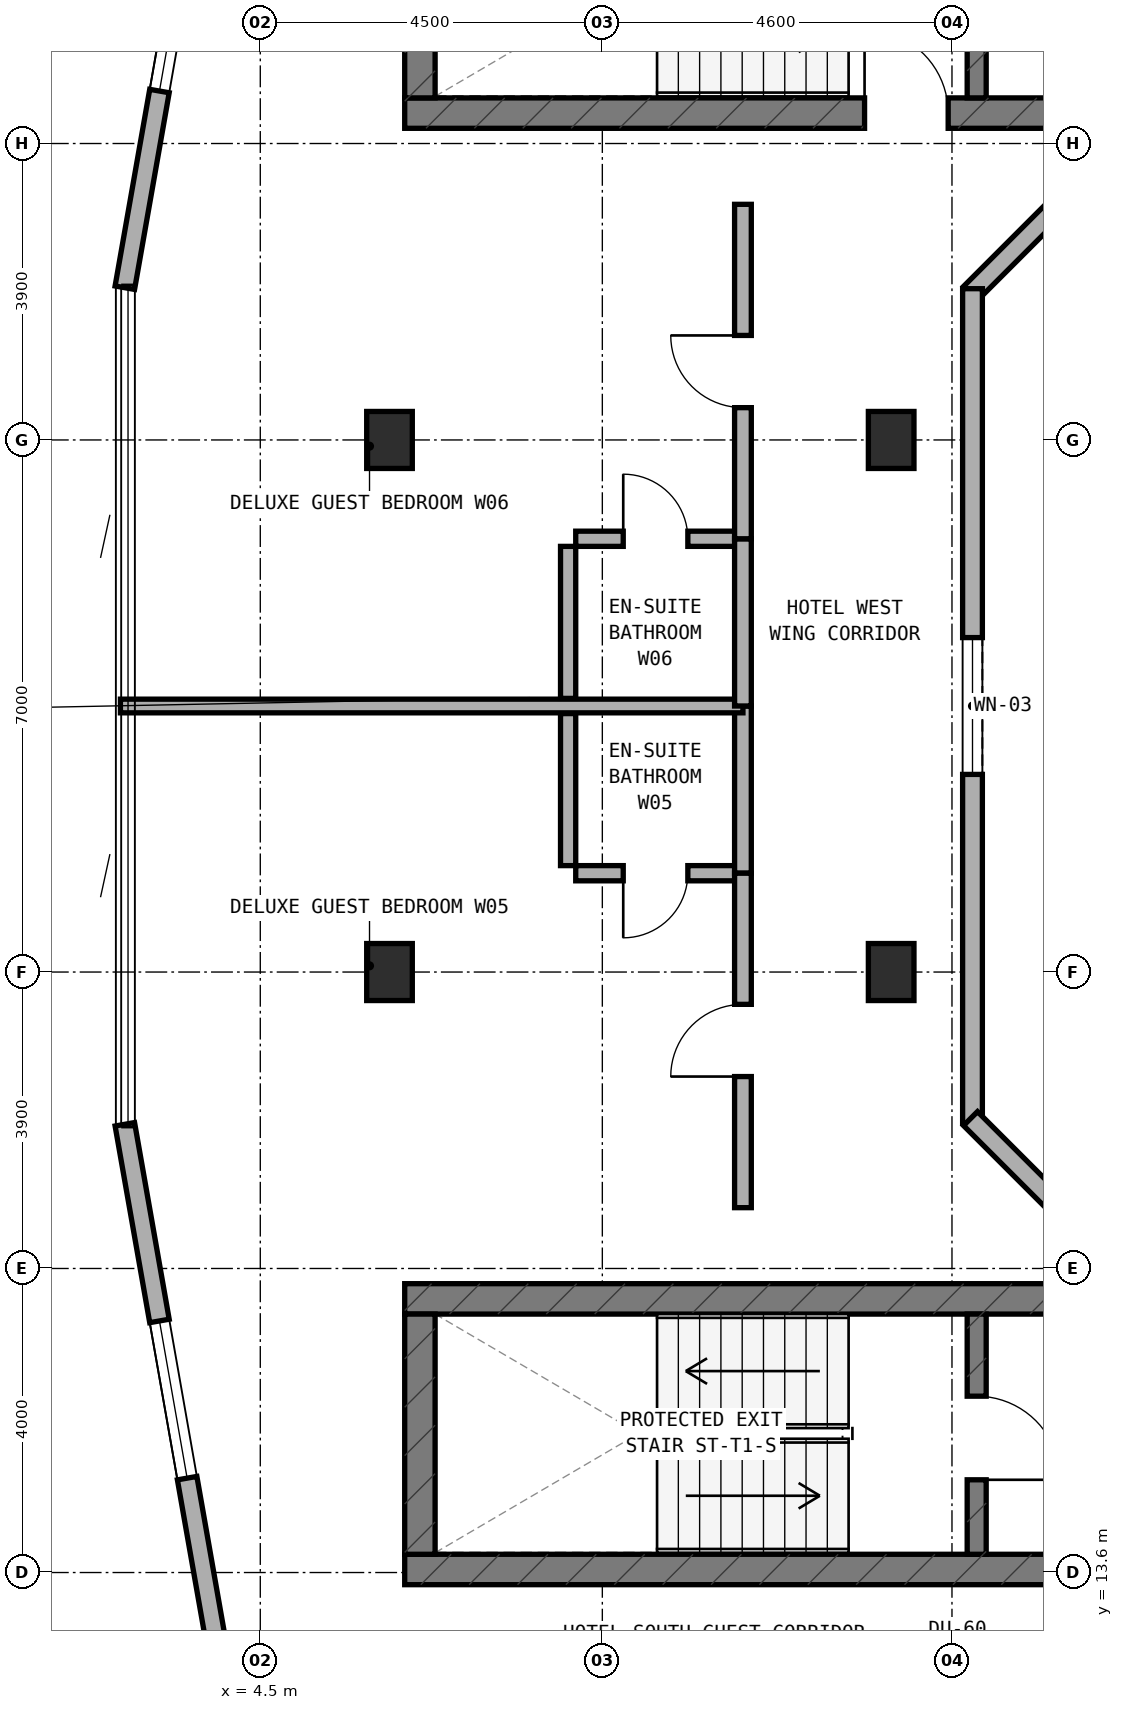
"""IFC4 building model, lengths in metres.
Left out: names, types, materials, properties, quantities, classifications, styles, units other than length and angle.
Written with IfcOpenShell. Run it as: python <this file> out.ifc"""

import sys

from ifc_helpers import new_model, si_unit, direction, frame, frame_2d, origin, origin_2d, place, context, subcontext, project, spatial, rectangle, extrude, element, fill, save


model = new_model("IFC4")
c1 = context("Model", 3, precision=1e-05, world=origin(), true_north=direction((0.0, 1.0)))
c2 = subcontext(c1, "Body", "Model", "MODEL_VIEW")
j1 = project(units=[si_unit("LENGTHUNIT", "METRE"), si_unit("PLANEANGLEUNIT", "RADIAN")], contexts=[c1])
p1 = place(None, origin())
s1 = spatial("IfcSite", under=j1, at=p1, CompositionType="ELEMENT")
p2 = place(p1, origin())
s2 = spatial("IfcBuilding", under=s1, at=p2, CompositionType="ELEMENT")
p3 = place(p2, frame((0.0, 0.0, 246.8)))
s3 = spatial("IfcBuildingStorey", under=s2, at=p3, CompositionType="ELEMENT", Elevation=246.8)
p4 = place(p3, frame((6.4, 32.8, 0.0), z_axis=(0.0, 0.0, 1.0), x_axis=(1.0, 0.0, 0.0)))
e1 = element("IfcWall", 1, at=p4, inside=s3, PredefinedType="SHEAR", context=c2, shape_type="SweptSolid", body=[
    extrude(rectangle(XDim=24.4, YDim=0.4, at=frame_2d((12.2, 0.0))), origin(), (0.0, 0.0, 1.0), 3.6),
])
p5 = place(p4, frame((6.05, 0.0, 0.0)))
e2 = element("IfcOpeningElement", 2, at=p5, cuts=e1, PredefinedType="OPENING", context=c2, shape_type="SweptSolid", body=[
    extrude(rectangle(XDim=1.1, YDim=2.15, at=frame_2d((0.55, 1.075))), frame((0.0, 0.21, 0.0), z_axis=(0.0, -1.0, 0.0), x_axis=(1.0, 0.0, 0.0)), (0.0, 0.0, 1.0), 0.42),
])
p6 = place(p3, frame((6.6, 33.0, 0.0), z_axis=(0.0, 0.0, 1.0), x_axis=(0.0, 1.0, 0.0)))
e3 = element("IfcWall", 3, at=p6, inside=s3, PredefinedType="SHEAR", context=c2, shape_type="SweptSolid", body=[
    extrude(rectangle(XDim=3.16, YDim=0.4, at=frame_2d((1.58, 0.0))), origin(), (0.0, 0.0, 1.0), 3.6),
])
p7 = place(p3, frame((13.925, 33.0, 0.0), z_axis=(0.0, 0.0, 1.0), x_axis=(0.0, 1.0, 0.0)))
e4 = element("IfcWall", 4, at=p7, inside=s3, PredefinedType="STANDARD", context=c2, shape_type="SweptSolid", body=[
    extrude(rectangle(XDim=3.16, YDim=0.25, at=frame_2d((1.58, 0.0))), origin(), (0.0, 0.0, 1.0), 3.32),
])
p8 = place(p7, frame((0.98, 0.0, 0.0)))
e5 = element("IfcOpeningElement", 5, at=p8, cuts=e4, PredefinedType="OPENING", context=c2, shape_type="SweptSolid", body=[
    extrude(rectangle(XDim=1.1, YDim=2.15, at=frame_2d((0.55, 1.075))), frame((0.0, 0.135, 0.0), z_axis=(0.0, -1.0, 0.0), x_axis=(1.0, 0.0, 0.0)), (0.0, 0.0, 1.0), 0.27),
])
p9 = place(p3, frame((6.4, 13.64, 0.0), z_axis=(0.0, 0.0, 1.0), x_axis=(1.0, 0.0, 0.0)))
e6 = element("IfcWall", 6, at=p9, inside=s3, PredefinedType="SHEAR", context=c2, shape_type="SweptSolid", body=[
    extrude(rectangle(XDim=24.4, YDim=0.4, at=frame_2d((12.2, 0.0))), origin(), (0.0, 0.0, 1.0), 3.6),
])
p10 = place(p9, frame((9.15, 0.0, 0.0)))
e7 = element("IfcOpeningElement", 7, at=p10, cuts=e6, PredefinedType="OPENING", context=c2, shape_type="SweptSolid", body=[
    extrude(rectangle(XDim=1.2, YDim=2.15, at=frame_2d((0.6, 1.075))), frame((0.0, 0.21, 0.0), z_axis=(0.0, -1.0, 0.0), x_axis=(1.0, 0.0, 0.0)), (0.0, 0.0, 1.0), 0.42),
])
p11 = place(p9, frame((17.22, 0.0, 0.0)))
e8 = element("IfcOpeningElement", 8, at=p11, cuts=e6, PredefinedType="OPENING", context=c2, shape_type="SweptSolid", body=[
    extrude(rectangle(XDim=0.85, YDim=2.1, at=frame_2d((0.425, 1.05))), frame((0.0, 0.21, 0.0), z_axis=(0.0, -1.0, 0.0), x_axis=(1.0, 0.0, 0.0)), (0.0, 0.0, 1.0), 0.42),
])
p12 = place(p9, frame((18.783, 0.0, 0.0)))
e9 = element("IfcOpeningElement", 9, at=p12, cuts=e6, PredefinedType="OPENING", context=c2, shape_type="SweptSolid", body=[
    extrude(rectangle(XDim=1.1, YDim=2.15, at=frame_2d((0.55, 1.075))), frame((0.0, 0.21, 0.0), z_axis=(0.0, -1.0, 0.0), x_axis=(1.0, 0.0, 0.0)), (0.0, 0.0, 1.0), 0.42),
])
p13 = place(p9, frame((20.65, 0.0, 0.0)))
e10 = element("IfcOpeningElement", 10, at=p13, cuts=e6, PredefinedType="OPENING", context=c2, shape_type="SweptSolid", body=[
    extrude(rectangle(XDim=1.1, YDim=2.15, at=frame_2d((0.55, 1.075))), frame((0.0, 0.21, 0.0), z_axis=(0.0, -1.0, 0.0), x_axis=(1.0, 0.0, 0.0)), (0.0, 0.0, 1.0), 0.42),
])
p14 = place(p9, frame((22.517, 0.0, 0.0)))
e11 = element("IfcOpeningElement", 11, at=p14, cuts=e6, PredefinedType="OPENING", context=c2, shape_type="SweptSolid", body=[
    extrude(rectangle(XDim=1.1, YDim=2.15, at=frame_2d((0.55, 1.075))), frame((0.0, 0.21, 0.0), z_axis=(0.0, -1.0, 0.0), x_axis=(1.0, 0.0, 0.0)), (0.0, 0.0, 1.0), 0.42),
])
p15 = place(p3, frame((6.4, 17.2, 0.0), z_axis=(0.0, 0.0, 1.0), x_axis=(1.0, 0.0, 0.0)))
e12 = element("IfcWall", 12, at=p15, inside=s3, PredefinedType="SHEAR", context=c2, shape_type="SweptSolid", body=[
    extrude(rectangle(XDim=24.4, YDim=0.4, at=frame_2d((12.2, 0.0))), origin(), (0.0, 0.0, 1.0), 3.6),
])
p16 = place(p3, frame((6.6, 13.84, 0.0), z_axis=(0.0, 0.0, 1.0), x_axis=(0.0, 1.0, 0.0)))
e13 = element("IfcWall", 13, at=p16, inside=s3, PredefinedType="SHEAR", context=c2, shape_type="SweptSolid", body=[
    extrude(rectangle(XDim=3.16, YDim=0.4, at=frame_2d((1.58, 0.0))), origin(), (0.0, 0.0, 1.0), 3.6),
])
p17 = place(p3, frame((13.925, 13.84, 0.0), z_axis=(0.0, 0.0, 1.0), x_axis=(0.0, 1.0, 0.0)))
e14 = element("IfcWall", 14, at=p17, inside=s3, PredefinedType="STANDARD", context=c2, shape_type="SweptSolid", body=[
    extrude(rectangle(XDim=3.16, YDim=0.25, at=frame_2d((1.58, 0.0))), origin(), (0.0, 0.0, 1.0), 3.32),
])
p18 = place(p17, frame((0.98, 0.0, 0.0)))
e15 = element("IfcOpeningElement", 15, at=p18, cuts=e14, PredefinedType="OPENING", context=c2, shape_type="SweptSolid", body=[
    extrude(rectangle(XDim=1.1, YDim=2.15, at=frame_2d((0.55, 1.075))), frame((0.0, 0.135, 0.0), z_axis=(0.0, -1.0, 0.0), x_axis=(1.0, 0.0, 0.0)), (0.0, 0.0, 1.0), 0.27),
])
for number, where, z_axis, x_axis in (
    (16, (6.2, 21.5, 0.0), (0.0, 0.0, 1.0), (1.0, 0.0, 0.0)),
    (17, (6.2, 28.5, 0.0), (0.0, 0.0, 1.0), (1.0, 0.0, 0.0)),
    (18, (12.8, 21.5, 0.0), (0.0, 0.0, 1.0), (1.0, 0.0, 0.0)),
    (19, (12.8, 28.5, 0.0), (0.0, 0.0, 1.0), (1.0, 0.0, 0.0)),
):
    element("IfcColumn", number, at=place(p3, frame(where, z_axis=z_axis, x_axis=x_axis)), inside=s3, PredefinedType="COLUMN", context=c2, shape_type="SweptSolid", body=[
        extrude(rectangle(XDim=0.6, YDim=0.75, at=origin_2d()), origin(), (0.0, 0.0, 1.0), 3.6),
    ])
p19 = place(p3, frame((4.229, 39.085, 0.0), z_axis=(0.0, 0.0, 1.0), x_axis=(-0.173396937698, -0.984852020355, 0.0)))
e20 = element("IfcWall", 20, at=p19, inside=s3, PredefinedType="STANDARD", context=c2, shape_type="SweptSolid", body=[
    extrude(rectangle(XDim=8.714, YDim=0.26, at=frame_2d((4.357, 0.0))), origin(), (0.0, 0.0, 1.0), 3.32),
])
p20 = place(p19, frame((3.987, 0.0, 0.85)))
e21 = element("IfcOpeningElement", 21, at=p20, cuts=e20, PredefinedType="OPENING", context=c2, shape_type="SweptSolid", body=[
    extrude(rectangle(XDim=2.1, YDim=1.5, at=frame_2d((1.05, 0.75))), frame((0.0, 0.14, 0.0), z_axis=(0.0, -1.0, 0.0), x_axis=(1.0, 0.0, 0.0)), (0.0, 0.0, 1.0), 0.28),
])
p21 = place(p3, frame((2.718, 19.497, 0.0), z_axis=(0.0, 0.0, 1.0), x_axis=(0.173396937698, -0.984852020355, 0.0)))
e22 = element("IfcWall", 22, at=p21, inside=s3, PredefinedType="STANDARD", context=c2, shape_type="SweptSolid", body=[
    extrude(rectangle(XDim=8.714, YDim=0.26, at=frame_2d((4.357, 0.0))), origin(), (0.0, 0.0, 1.0), 3.32),
])
p22 = place(p21, frame((2.627, 0.0, 0.85)))
e23 = element("IfcOpeningElement", 23, at=p22, cuts=e22, PredefinedType="OPENING", context=c2, shape_type="SweptSolid", body=[
    extrude(rectangle(XDim=2.1, YDim=1.5, at=frame_2d((1.05, 0.75))), frame((0.0, 0.14, 0.0), z_axis=(0.0, -1.0, 0.0), x_axis=(1.0, 0.0, 0.0)), (0.0, 0.0, 1.0), 0.28),
])
p23 = place(p3, frame((15.678, 32.262, 0.0), z_axis=(0.0, 0.0, 1.0), x_axis=(-0.707106781187, -0.707106781187, 0.0)))
e24 = element("IfcWall", 24, at=p23, inside=s3, PredefinedType="STANDARD", context=c2, shape_type="SweptSolid", body=[
    extrude(rectangle(XDim=2.594, YDim=0.26, at=frame_2d((1.297, 0.0))), origin(), (0.0, 0.0, 1.0), 3.32),
])
p24 = place(p3, frame((13.87, 30.49, 0.0), z_axis=(0.0, 0.0, 1.0), x_axis=(0.0, -1.0, 0.0)))
e25 = element("IfcWall", 25, at=p24, inside=s3, PredefinedType="STANDARD", context=c2, shape_type="SweptSolid", body=[
    extrude(rectangle(XDim=10.98, YDim=0.26, at=frame_2d((5.49, 0.0))), origin(), (0.0, 0.0, 1.0), 3.32),
])
p25 = place(p24, frame((4.59, 0.0, 0.85)))
e26 = element("IfcOpeningElement", 26, at=p25, cuts=e25, PredefinedType="OPENING", context=c2, shape_type="SweptSolid", body=[
    extrude(rectangle(XDim=1.8, YDim=1.5, at=frame_2d((0.9, 0.75))), frame((0.0, 0.14, 0.0), z_axis=(0.0, -1.0, 0.0), x_axis=(1.0, 0.0, 0.0)), (0.0, 0.0, 1.0), 0.28),
])
p26 = place(p3, frame((13.844, 19.572, 0.0), z_axis=(0.0, 0.0, 1.0), x_axis=(0.707106781187, -0.707106781187, 0.0)))
e27 = element("IfcWall", 27, at=p26, inside=s3, PredefinedType="STANDARD", context=c2, shape_type="SweptSolid", body=[
    extrude(rectangle(XDim=2.594, YDim=0.26, at=frame_2d((1.297, 0.0))), origin(), (0.0, 0.0, 1.0), 3.32),
])
p27 = place(p3, frame((8.65, 22.8, 0.0), z_axis=(0.0, 0.0, 1.0), x_axis=(1.0, 0.0, 0.0)))
e28 = element("IfcWall", 28, at=p27, inside=s3, PredefinedType="PLUMBINGWALL", context=c2, shape_type="SweptSolid", body=[
    extrude(rectangle(XDim=2.1, YDim=0.2, at=frame_2d((1.05, 0.0))), origin(), (0.0, 0.0, 1.0), 3.32),
])
p28 = place(p27, frame((0.625, 0.0, 0.0)))
e29 = element("IfcOpeningElement", 29, at=p28, cuts=e28, PredefinedType="OPENING", context=c2, shape_type="SweptSolid", body=[
    extrude(rectangle(XDim=0.85, YDim=2.1, at=frame_2d((0.425, 1.05))), frame((0.0, 0.11, 0.0), z_axis=(0.0, -1.0, 0.0), x_axis=(1.0, 0.0, 0.0)), (0.0, 0.0, 1.0), 0.22),
])
p29 = place(p3, frame((8.55, 22.9, 0.0), z_axis=(0.0, 0.0, 1.0), x_axis=(0.0, 1.0, 0.0)))
e30 = element("IfcWall", 30, at=p29, inside=s3, PredefinedType="PLUMBINGWALL", context=c2, shape_type="SweptSolid", body=[
    extrude(rectangle(XDim=2.0, YDim=0.2, at=frame_2d((1.0, 0.0))), origin(), (0.0, 0.0, 1.0), 3.32),
])
p30 = place(p3, frame((10.85, 22.8, 0.0), z_axis=(0.0, 0.0, 1.0), x_axis=(0.0, 1.0, 0.0)))
e31 = element("IfcWall", 31, at=p30, inside=s3, PredefinedType="SOLIDWALL", context=c2, shape_type="SweptSolid", body=[
    extrude(rectangle(XDim=2.2, YDim=0.22, at=frame_2d((1.1, 0.0))), origin(), (0.0, 0.0, 1.0), 3.32),
])
p31 = place(p3, frame((10.85, 18.4, 0.0), z_axis=(0.0, 0.0, 1.0), x_axis=(0.0, 1.0, 0.0)))
e32 = element("IfcWall", 32, at=p31, inside=s3, PredefinedType="SOLIDWALL", context=c2, shape_type="SweptSolid", body=[
    extrude(rectangle(XDim=4.4, YDim=0.22, at=frame_2d((2.2, 0.0))), origin(), (0.0, 0.0, 1.0), 2.745),
])
p32 = place(p31, frame((1.725, 0.0, 0.0)))
e33 = element("IfcOpeningElement", 33, at=p32, cuts=e32, PredefinedType="OPENING", context=c2, shape_type="SweptSolid", body=[
    extrude(rectangle(XDim=0.95, YDim=2.1, at=frame_2d((0.475, 1.05))), frame((0.0, 0.12, 0.0), z_axis=(0.0, -1.0, 0.0), x_axis=(1.0, 0.0, 0.0)), (0.0, 0.0, 1.0), 0.24),
])
p33 = place(p3, frame((2.66, 25.0, 0.0), z_axis=(0.0, 0.0, 1.0), x_axis=(1.0, 0.0, 0.0)))
e34 = element("IfcWall", 34, at=p33, inside=s3, PredefinedType="SOLIDWALL", context=c2, shape_type="SweptSolid", body=[
    extrude(rectangle(XDim=8.19, YDim=0.18, at=frame_2d((4.095, 0.0))), origin(), (0.0, 0.0, 1.0), 3.015),
])
p34 = place(p3, frame((8.65, 27.2, 0.0), z_axis=(0.0, 0.0, 1.0), x_axis=(1.0, 0.0, 0.0)))
e35 = element("IfcWall", 35, at=p34, inside=s3, PredefinedType="PLUMBINGWALL", context=c2, shape_type="SweptSolid", body=[
    extrude(rectangle(XDim=2.1, YDim=0.2, at=frame_2d((1.05, 0.0))), origin(), (0.0, 0.0, 1.0), 3.32),
])
p35 = place(p34, frame((0.625, 0.0, 0.0)))
e36 = element("IfcOpeningElement", 36, at=p35, cuts=e35, PredefinedType="OPENING", context=c2, shape_type="SweptSolid", body=[
    extrude(rectangle(XDim=0.85, YDim=2.1, at=frame_2d((0.425, 1.05))), frame((0.0, 0.11, 0.0), z_axis=(0.0, -1.0, 0.0), x_axis=(1.0, 0.0, 0.0)), (0.0, 0.0, 1.0), 0.22),
])
p36 = place(p3, frame((8.55, 25.1, 0.0), z_axis=(0.0, 0.0, 1.0), x_axis=(0.0, 1.0, 0.0)))
e37 = element("IfcWall", 37, at=p36, inside=s3, PredefinedType="PLUMBINGWALL", context=c2, shape_type="SweptSolid", body=[
    extrude(rectangle(XDim=2.0, YDim=0.2, at=frame_2d((1.0, 0.0))), origin(), (0.0, 0.0, 1.0), 3.32),
])
p37 = place(p3, frame((10.85, 25.0, 0.0), z_axis=(0.0, 0.0, 1.0), x_axis=(0.0, 1.0, 0.0)))
e38 = element("IfcWall", 38, at=p37, inside=s3, PredefinedType="SOLIDWALL", context=c2, shape_type="SweptSolid", body=[
    extrude(rectangle(XDim=2.2, YDim=0.22, at=frame_2d((1.1, 0.0))), origin(), (0.0, 0.0, 1.0), 3.32),
])
p38 = place(p3, frame((10.85, 27.2, 0.0), z_axis=(0.0, 0.0, 1.0), x_axis=(0.0, 1.0, 0.0)))
e39 = element("IfcWall", 39, at=p38, inside=s3, PredefinedType="SOLIDWALL", context=c2, shape_type="SweptSolid", body=[
    extrude(rectangle(XDim=4.4, YDim=0.22, at=frame_2d((2.2, 0.0))), origin(), (0.0, 0.0, 1.0), 2.745),
])
p39 = place(p38, frame((1.725, 0.0, 0.0)))
e40 = element("IfcOpeningElement", 40, at=p39, cuts=e39, PredefinedType="OPENING", context=c2, shape_type="SweptSolid", body=[
    extrude(rectangle(XDim=0.95, YDim=2.1, at=frame_2d((0.475, 1.05))), frame((0.0, 0.12, 0.0), z_axis=(0.0, -1.0, 0.0), x_axis=(1.0, 0.0, 0.0)), (0.0, 0.0, 1.0), 0.24),
])
p40 = place(p20, origin())
e41 = element("IfcWindow", 41, at=p40, inside=s3, PartitioningType="SINGLE_PANEL", PredefinedType="WINDOW", context=c2, shape_type="SweptSolid", body=[
    extrude(rectangle(XDim=2.1, YDim=1.5, at=frame_2d((1.05, 0.75))), frame((0.0, 0.03, 0.0), z_axis=(0.0, -1.0, 0.0), x_axis=(1.0, 0.0, 0.0)), (0.0, 0.0, 1.0), 0.06),
])
fill(e21, e41)
p41 = place(p22, origin())
e42 = element("IfcWindow", 42, at=p41, inside=s3, PartitioningType="SINGLE_PANEL", PredefinedType="WINDOW", context=c2, shape_type="SweptSolid", body=[
    extrude(rectangle(XDim=2.1, YDim=1.5, at=frame_2d((1.05, 0.75))), frame((0.0, 0.03, 0.0), z_axis=(0.0, -1.0, 0.0), x_axis=(1.0, 0.0, 0.0)), (0.0, 0.0, 1.0), 0.06),
])
fill(e23, e42)
p42 = place(p25, origin())
e43 = element("IfcWindow", 43, at=p42, inside=s3, PartitioningType="SINGLE_PANEL", PredefinedType="WINDOW", context=c2, shape_type="SweptSolid", body=[
    extrude(rectangle(XDim=1.8, YDim=1.5, at=frame_2d((0.9, 0.75))), frame((0.0, 0.03, 0.0), z_axis=(0.0, -1.0, 0.0), x_axis=(1.0, 0.0, 0.0)), (0.0, 0.0, 1.0), 0.06),
])
fill(e26, e43)
p43 = place(p18, frame((1.1, 0.0, 0.0), z_axis=(0.0, 0.0, 1.0), x_axis=(-1.0, 0.0, 0.0)))
e44 = element("IfcDoor", 44, at=p43, inside=s3, OperationType="SINGLE_SWING_RIGHT", PredefinedType="DOOR", context=c2, shape_type="SweptSolid", body=[
    extrude(rectangle(XDim=1.1, YDim=2.15, at=frame_2d((0.55, 1.075))), frame((0.0, 0.025, 0.0), z_axis=(0.0, -1.0, 0.0), x_axis=(1.0, 0.0, 0.0)), (0.0, 0.0, 1.0), 0.05),
])
fill(e15, e44)
p44 = place(p5, origin())
e45 = element("IfcDoor", 45, at=p44, inside=s3, OperationType="SINGLE_SWING_LEFT", PredefinedType="DOOR", context=c2, shape_type="SweptSolid", body=[
    extrude(rectangle(XDim=1.1, YDim=2.15, at=frame_2d((0.55, 1.075))), frame((0.0, 0.025, 0.0), z_axis=(0.0, -1.0, 0.0), x_axis=(1.0, 0.0, 0.0)), (0.0, 0.0, 1.0), 0.05),
])
fill(e2, e45)
p45 = place(p28, frame((0.85, 0.0, 0.0), z_axis=(0.0, 0.0, 1.0), x_axis=(-1.0, 0.0, 0.0)))
e46 = element("IfcDoor", 46, at=p45, inside=s3, OperationType="SINGLE_SWING_RIGHT", PredefinedType="DOOR", context=c2, shape_type="SweptSolid", body=[
    extrude(rectangle(XDim=0.85, YDim=2.1, at=frame_2d((0.425, 1.05))), frame((0.0, 0.025, 0.0), z_axis=(0.0, -1.0, 0.0), x_axis=(1.0, 0.0, 0.0)), (0.0, 0.0, 1.0), 0.05),
])
fill(e29, e46)
p46 = place(p32, origin())
e47 = element("IfcDoor", 47, at=p46, inside=s3, OperationType="SINGLE_SWING_LEFT", PredefinedType="DOOR", context=c2, shape_type="SweptSolid", body=[
    extrude(rectangle(XDim=0.95, YDim=2.1, at=frame_2d((0.475, 1.05))), frame((0.0, 0.025, 0.0), z_axis=(0.0, -1.0, 0.0), x_axis=(1.0, 0.0, 0.0)), (0.0, 0.0, 1.0), 0.05),
])
fill(e33, e47)
p47 = place(p35, origin())
e48 = element("IfcDoor", 48, at=p47, inside=s3, OperationType="SINGLE_SWING_LEFT", PredefinedType="DOOR", context=c2, shape_type="SweptSolid", body=[
    extrude(rectangle(XDim=0.85, YDim=2.1, at=frame_2d((0.425, 1.05))), frame((0.0, 0.025, 0.0), z_axis=(0.0, -1.0, 0.0), x_axis=(1.0, 0.0, 0.0)), (0.0, 0.0, 1.0), 0.05),
])
fill(e36, e48)
p48 = place(p39, origin())
e49 = element("IfcDoor", 49, at=p48, inside=s3, OperationType="SINGLE_SWING_RIGHT", PredefinedType="DOOR", context=c2, shape_type="SweptSolid", body=[
    extrude(rectangle(XDim=0.95, YDim=2.1, at=frame_2d((0.475, 1.05))), frame((0.0, 0.025, 0.0), z_axis=(0.0, -1.0, 0.0), x_axis=(1.0, 0.0, 0.0)), (0.0, 0.0, 1.0), 0.05),
])
fill(e40, e49)
save(model, sys.argv[1])
